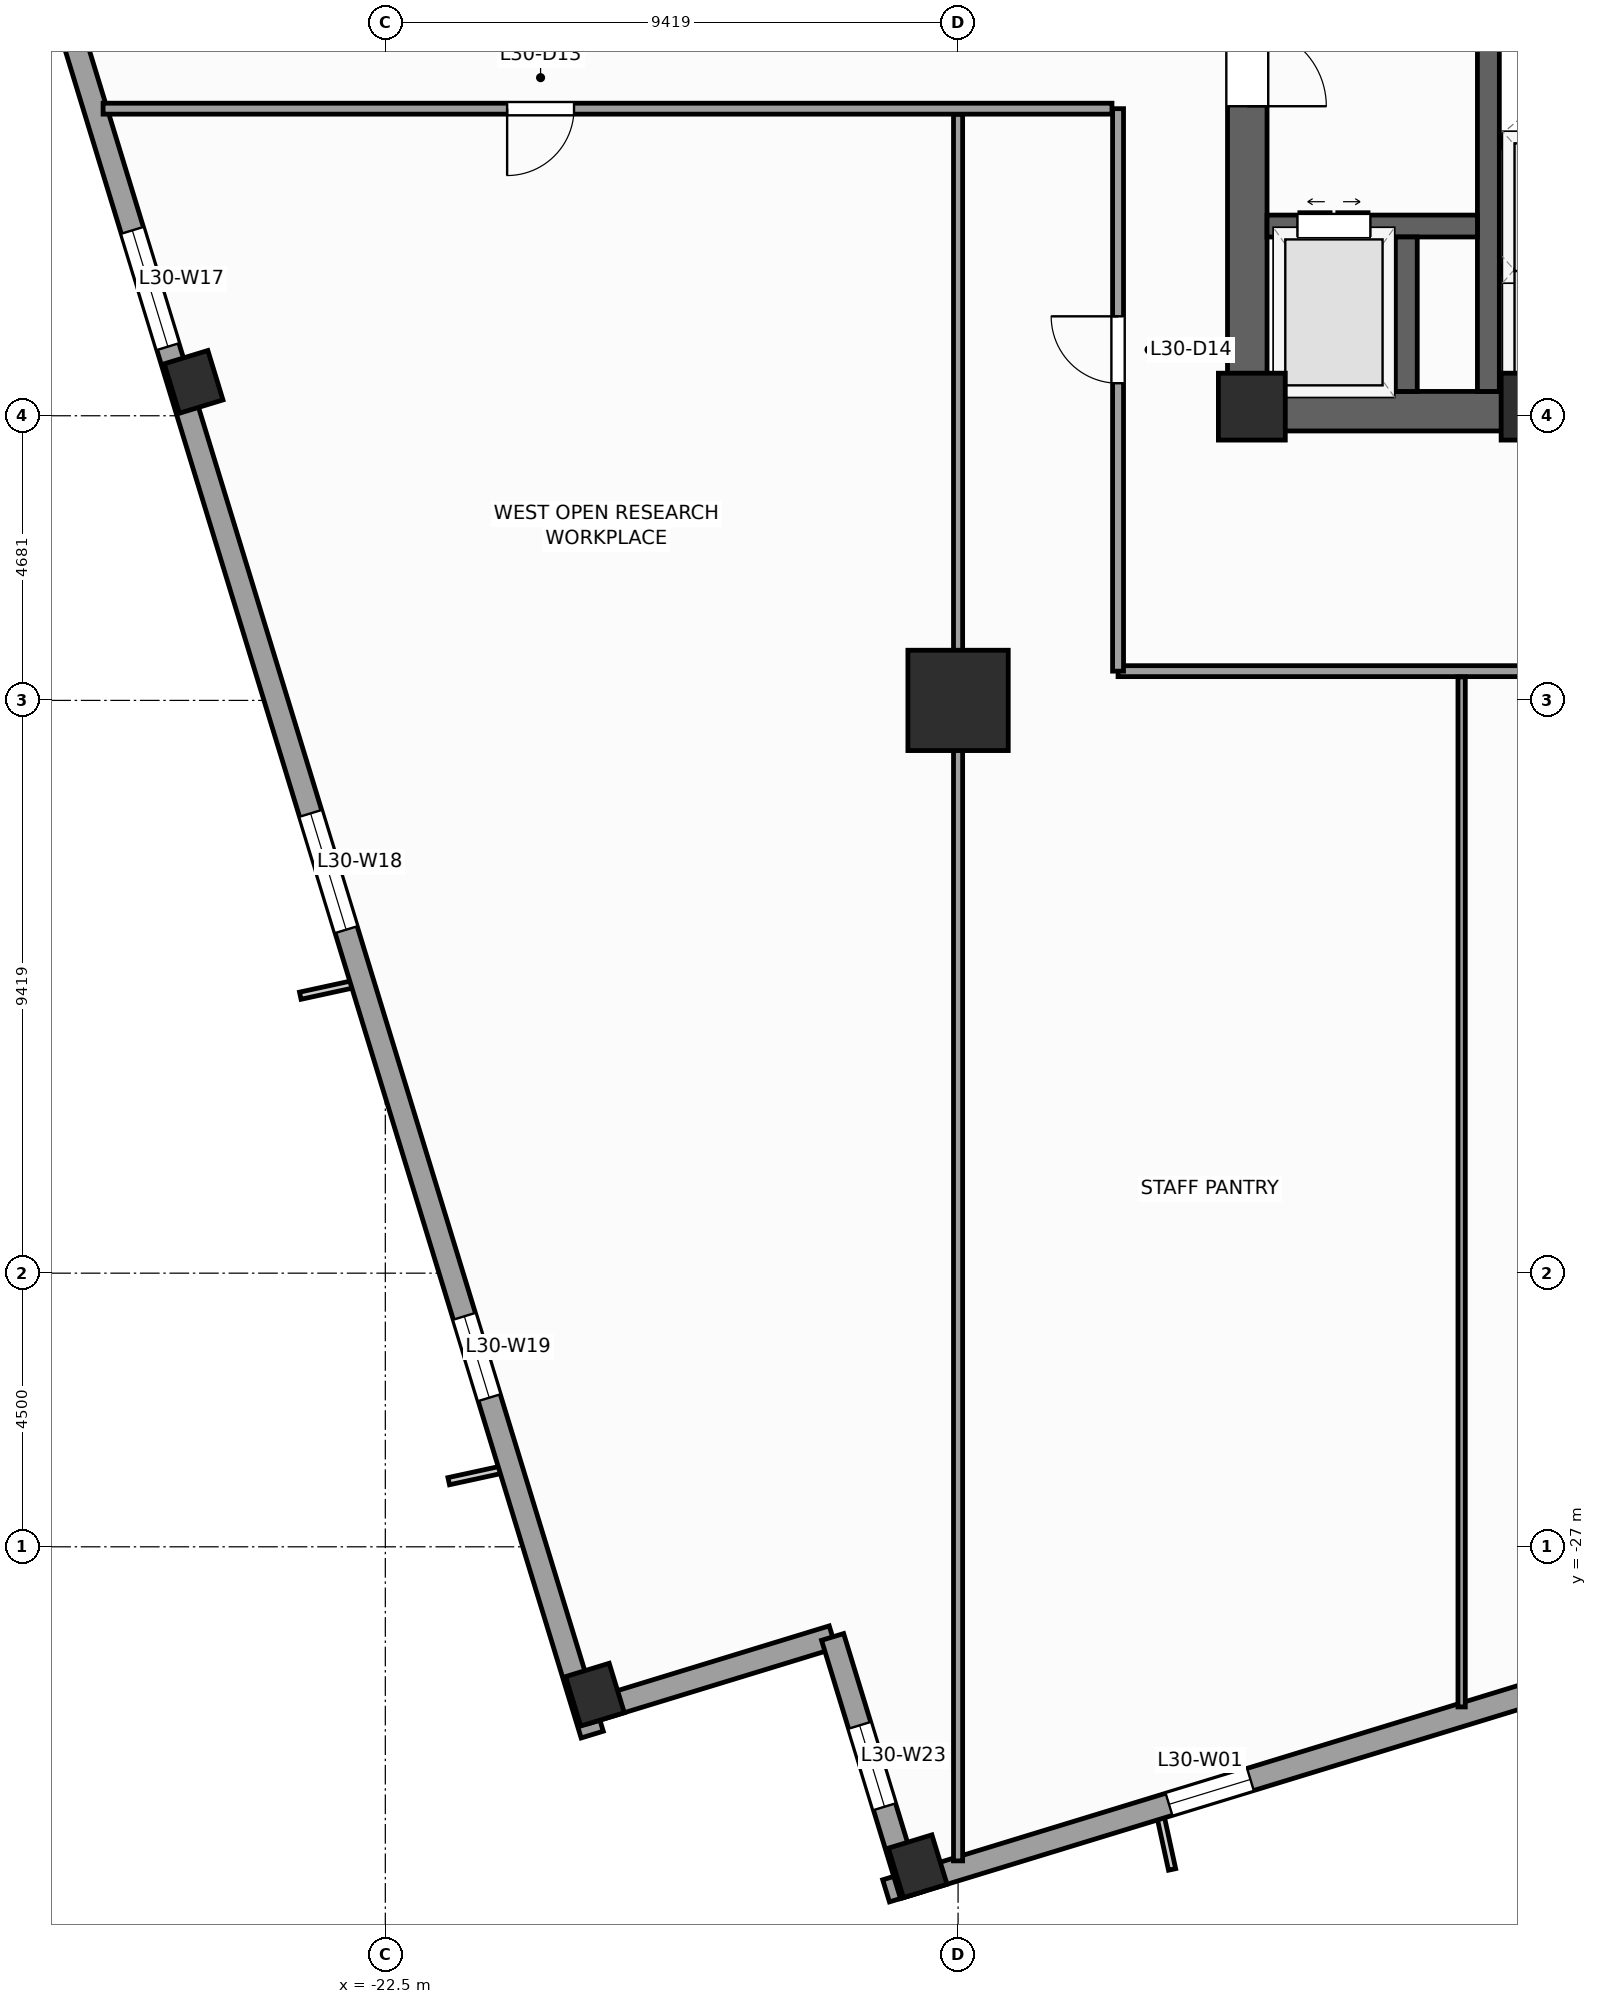
"""IFC4 building model, lengths in metres.
Left out: names, types, materials, properties, quantities, classifications, styles, units other than length and angle.
Written with IfcOpenShell. Run it as: python <this file> out.ifc"""

import sys

from ifc_helpers import new_model, si_unit, direction, frame, frame_2d, origin, origin_2d, place, context, subcontext, project, spatial, rectangle, extrude, source, transform, mapped, element, fill, save


model = new_model("IFC4")
c1 = context("Model", 3, precision=1e-05, world=origin(), true_north=direction((0.0, 1.0)))
c2 = subcontext(c1, "Body", "Model", "MODEL_VIEW")
j1 = project(units=[si_unit("LENGTHUNIT", "METRE"), si_unit("PLANEANGLEUNIT", "RADIAN")], contexts=[c1])
p1 = place(None, origin())
s1 = spatial("IfcSite", under=j1, at=p1, CompositionType="ELEMENT")
p2 = place(p1, origin())
s2 = spatial("IfcBuilding", under=s1, at=p2, CompositionType="ELEMENT")
p3 = place(p2, frame((0.0, 0.0, 127.2)))
s3 = spatial("IfcBuildingStorey", under=s2, at=p3, CompositionType="ELEMENT", Elevation=127.2)
p4 = place(p3, frame((-8.65, -8.325, 0.0), z_axis=(0.0, 0.0, 1.0), x_axis=(1.0, 0.0, 0.0)))
e1 = element("IfcWall", 1, at=p4, inside=s3, PredefinedType="SHEAR", context=c2, shape_type="SweptSolid", body=[
    extrude(rectangle(XDim=17.3, YDim=0.65, at=frame_2d((8.65, 0.0))), origin(), (0.0, 0.0, 1.0), 4.0),
])
p5 = place(p4, frame((8.0, 0.0, 0.0)))
e2 = element("IfcOpeningElement", 2, at=p5, cuts=e1, PredefinedType="OPENING", context=c2, shape_type="SweptSolid", body=[
    extrude(rectangle(XDim=1.3, YDim=2.2, at=frame_2d((0.65, 1.1))), frame((0.0, 0.335, 0.0), z_axis=(0.0, -1.0, 0.0), x_axis=(1.0, 0.0, 0.0)), (0.0, 0.0, 1.0), 0.67),
])
p6 = place(p3, frame((-8.325, -8.0, 0.0), z_axis=(0.0, 0.0, 1.0), x_axis=(0.0, 1.0, 0.0)))
e3 = element("IfcWall", 3, at=p6, inside=s3, PredefinedType="SHEAR", context=c2, shape_type="SweptSolid", body=[
    extrude(rectangle(XDim=16.0, YDim=0.65, at=frame_2d((8.0, 0.0))), origin(), (0.0, 0.0, 1.0), 4.0),
])
p7 = place(p6, frame((4.69, 0.0, 0.0)))
e4 = element("IfcOpeningElement", 4, at=p7, cuts=e3, PredefinedType="OPENING", context=c2, shape_type="SweptSolid", body=[
    extrude(rectangle(XDim=1.3, YDim=2.2, at=frame_2d((0.65, 1.1))), frame((0.0, 0.335, 0.0), z_axis=(0.0, -1.0, 0.0), x_axis=(1.0, 0.0, 0.0)), (0.0, 0.0, 1.0), 0.67),
])
p8 = place(p3, frame((-4.36, -8.0, 0.0), z_axis=(0.0, 0.0, 1.0), x_axis=(0.0, 1.0, 0.0)))
e5 = element("IfcWall", 5, at=p8, inside=s3, PredefinedType="SHEAR", context=c2, shape_type="SweptSolid", body=[
    extrude(rectangle(XDim=16.0, YDim=0.36, at=frame_2d((8.0, 0.0))), origin(), (0.0, 0.0, 1.0), 4.0),
])
p9 = place(p3, frame((-8.0, -5.28, 0.0), z_axis=(0.0, 0.0, 1.0), x_axis=(1.0, 0.0, 0.0)))
e6 = element("IfcWall", 6, at=p9, inside=s3, PredefinedType="SHEAR", context=c2, shape_type="SweptSolid", body=[
    extrude(rectangle(XDim=3.46, YDim=0.36, at=frame_2d((1.73, 0.0))), origin(), (0.0, 0.0, 1.0), 4.0),
])
p10 = place(p9, frame((0.5, 0.0, 0.0)))
e7 = element("IfcOpeningElement", 7, at=p10, cuts=e6, PredefinedType="OPENING", context=c2, shape_type="SweptSolid", body=[
    extrude(rectangle(XDim=1.2, YDim=2.25, at=frame_2d((0.6, 1.125))), frame((0.0, 0.19, 0.0), z_axis=(0.0, -1.0, 0.0), x_axis=(1.0, 0.0, 0.0)), (0.0, 0.0, 1.0), 0.38),
])
p11 = place(p3, frame((-5.71, -8.0, 0.0), z_axis=(0.0, 0.0, 1.0), x_axis=(0.0, 1.0, 0.0)))
e8 = element("IfcWall", 8, at=p11, inside=s3, PredefinedType="SHEAR", context=c2, shape_type="SweptSolid", body=[
    extrude(rectangle(XDim=2.54, YDim=0.36, at=frame_2d((1.27, 0.0))), origin(), (0.0, 0.0, 1.0), 4.0),
])
m1 = source(origin(), c2, "Body", "SweptSolid", [
    extrude(rectangle(XDim=1.1, YDim=1.1, at=origin_2d()), origin(), (0.0, 0.0, 1.0), 4.0),
])
for number, where, z_axis, x_axis in (
    (9, (-8.25, -8.25, 0.0), (0.0, 0.0, 1.0), (1.0, 0.0, 0.0)),
    (10, (-3.6, -8.25, 0.0), (0.0, 0.0, 1.0), (1.0, 0.0, 0.0)),
):
    element("IfcColumn", number, at=place(p3, frame(where, z_axis=z_axis, x_axis=x_axis)), inside=s3, PredefinedType="PILASTER", context=c2, shape_type="MappedRepresentation", body=[
        mapped(m1, transform((0.0, 0.0, 0.0), scale=1.0)),
    ])
m2 = source(origin(), c2, "Body", "SweptSolid", [
    extrude(rectangle(XDim=1.65, YDim=1.65, at=origin_2d()), origin(), (0.0, 0.0, 1.0), 4.0),
])
p12 = place(p3, frame((-13.081, -13.081, 0.0), z_axis=(0.0, 0.0, 1.0), x_axis=(1.0, 0.0, 0.0)))
e11 = element("IfcColumn", 11, at=p12, inside=s3, PredefinedType="COLUMN", context=c2, shape_type="MappedRepresentation", body=[
    mapped(m2, transform((0.0, 0.0, 0.0), scale=1.0)),
])
m3 = source(origin(), c2, "Body", "SweptSolid", [
    extrude(rectangle(XDim=0.75, YDim=0.85, at=origin_2d()), origin(), (0.0, 0.0, 1.0), 4.0),
])
for number, where, z_axis, x_axis in (
    (12, (-13.746, -32.253, 0.0), (0.0, 0.0, 1.0), (0.956, 0.292, 0.0)),
    (13, (-25.653, -7.843, 0.0), (0.0, 0.0, 1.0), (0.956, 0.292, 0.0)),
    (14, (-19.052, -29.431, 0.0), (0.0, 0.0, 1.0), (0.956, 0.292, 0.0)),
):
    element("IfcColumn", number, at=place(p3, frame(where, z_axis=z_axis, x_axis=x_axis)), inside=s3, PredefinedType="COLUMN", context=c2, shape_type="MappedRepresentation", body=[
        mapped(m3, transform((0.0, 0.0, 0.0), scale=1.0)),
    ])
p13 = place(p3, frame((-14.265, -32.658, 0.0), z_axis=(0.0, 0.0, 1.0), x_axis=(0.956304320851, 0.292373127906, 0.0)))
e15 = element("IfcWall", 15, at=p13, inside=s3, PredefinedType="STANDARD", context=c2, shape_type="SweptSolid", body=[
    extrude(rectangle(XDim=46.38, YDim=0.38, at=frame_2d((23.19, 0.0))), origin(), (0.0, 0.0, 1.0), 3.14),
])
p14 = place(p13, frame((17.065, 0.0, 0.0)))
e16 = element("IfcOpeningElement", 16, at=p14, cuts=e15, PredefinedType="OPENING", context=c2, shape_type="SweptSolid", body=[
    extrude(rectangle(XDim=1.05, YDim=2.25, at=frame_2d((0.525, 1.125))), frame((0.0, 0.2, 0.0), z_axis=(0.0, -1.0, 0.0), x_axis=(1.0, 0.0, 0.0)), (0.0, 0.0, 1.0), 0.4),
])
p15 = place(p13, frame((4.865, 0.0, 0.51)))
e17 = element("IfcOpeningElement", 17, at=p15, cuts=e15, PredefinedType="OPENING", context=c2, shape_type="SweptSolid", body=[
    extrude(rectangle(XDim=1.4, YDim=2.4, at=frame_2d((0.7, 1.2))), frame((0.0, 0.2, 0.0), z_axis=(0.0, -1.0, 0.0), x_axis=(1.0, 0.0, 0.0)), (0.0, 0.0, 1.0), 0.4),
])
p16 = place(p13, frame((10.95, 0.0, 0.51)))
e18 = element("IfcOpeningElement", 18, at=p16, cuts=e15, PredefinedType="OPENING", context=c2, shape_type="SweptSolid", body=[
    extrude(rectangle(XDim=2.0, YDim=2.4, at=frame_2d((1.0, 1.2))), frame((0.0, 0.2, 0.0), z_axis=(0.0, -1.0, 0.0), x_axis=(1.0, 0.0, 0.0)), (0.0, 0.0, 1.0), 0.4),
])
p17 = place(p13, frame((20.512, 0.0, 0.51)))
e19 = element("IfcOpeningElement", 19, at=p17, cuts=e15, PredefinedType="OPENING", context=c2, shape_type="SweptSolid", body=[
    extrude(rectangle(XDim=2.0, YDim=2.4, at=frame_2d((1.0, 1.2))), frame((0.0, 0.2, 0.0), z_axis=(0.0, -1.0, 0.0), x_axis=(1.0, 0.0, 0.0)), (0.0, 0.0, 1.0), 0.4),
])
p18 = place(p13, frame((30.538, 0.0, 0.51)))
e20 = element("IfcOpeningElement", 20, at=p18, cuts=e15, PredefinedType="OPENING", context=c2, shape_type="SweptSolid", body=[
    extrude(rectangle(XDim=2.0, YDim=2.4, at=frame_2d((1.0, 1.2))), frame((0.0, 0.2, 0.0), z_axis=(0.0, -1.0, 0.0), x_axis=(1.0, 0.0, 0.0)), (0.0, 0.0, 1.0), 0.4),
])
p19 = place(p13, frame((39.187, 0.0, 0.51)))
e21 = element("IfcOpeningElement", 21, at=p19, cuts=e15, PredefinedType="OPENING", context=c2, shape_type="SweptSolid", body=[
    extrude(rectangle(XDim=1.4, YDim=2.4, at=frame_2d((0.7, 1.2))), frame((0.0, 0.2, 0.0), z_axis=(0.0, -1.0, 0.0), x_axis=(1.0, 0.0, 0.0)), (0.0, 0.0, 1.0), 0.4),
])
p20 = place(p3, frame((-32.658, 14.265, 0.0), z_axis=(0.0, 0.0, 1.0), x_axis=(0.292373127906, -0.956304320851, 0.0)))
e22 = element("IfcWall", 22, at=p20, inside=s3, PredefinedType="STANDARD", context=c2, shape_type="SweptSolid", body=[
    extrude(rectangle(XDim=46.38, YDim=0.38, at=frame_2d((23.19, 0.0))), origin(), (0.0, 0.0, 1.0), 3.14),
])
p21 = place(p20, frame((4.865, 0.0, 0.51)))
e23 = element("IfcOpeningElement", 23, at=p21, cuts=e22, PredefinedType="OPENING", context=c2, shape_type="SweptSolid", body=[
    extrude(rectangle(XDim=1.4, YDim=2.4, at=frame_2d((0.7, 1.2))), frame((0.0, 0.2, 0.0), z_axis=(0.0, -1.0, 0.0), x_axis=(1.0, 0.0, 0.0)), (0.0, 0.0, 1.0), 0.4),
])
p22 = place(p20, frame((12.45, 0.0, 0.51)))
e24 = element("IfcOpeningElement", 24, at=p22, cuts=e22, PredefinedType="OPENING", context=c2, shape_type="SweptSolid", body=[
    extrude(rectangle(XDim=2.0, YDim=2.4, at=frame_2d((1.0, 1.2))), frame((0.0, 0.2, 0.0), z_axis=(0.0, -1.0, 0.0), x_axis=(1.0, 0.0, 0.0)), (0.0, 0.0, 1.0), 0.4),
])
p23 = place(p20, frame((20.512, 0.0, 0.51)))
e25 = element("IfcOpeningElement", 25, at=p23, cuts=e22, PredefinedType="OPENING", context=c2, shape_type="SweptSolid", body=[
    extrude(rectangle(XDim=2.0, YDim=2.4, at=frame_2d((1.0, 1.2))), frame((0.0, 0.2, 0.0), z_axis=(0.0, -1.0, 0.0), x_axis=(1.0, 0.0, 0.0)), (0.0, 0.0, 1.0), 0.4),
])
p24 = place(p20, frame((30.538, 0.0, 0.51)))
e26 = element("IfcOpeningElement", 26, at=p24, cuts=e22, PredefinedType="OPENING", context=c2, shape_type="SweptSolid", body=[
    extrude(rectangle(XDim=2.0, YDim=2.4, at=frame_2d((1.0, 1.2))), frame((0.0, 0.2, 0.0), z_axis=(0.0, -1.0, 0.0), x_axis=(1.0, 0.0, 0.0)), (0.0, 0.0, 1.0), 0.4),
])
p25 = place(p20, frame((39.187, 0.0, 0.51)))
e27 = element("IfcOpeningElement", 27, at=p25, cuts=e22, PredefinedType="OPENING", context=c2, shape_type="SweptSolid", body=[
    extrude(rectangle(XDim=1.4, YDim=2.4, at=frame_2d((0.7, 1.2))), frame((0.0, 0.2, 0.0), z_axis=(0.0, -1.0, 0.0), x_axis=(1.0, 0.0, 0.0)), (0.0, 0.0, 1.0), 0.4),
])
p26 = place(p3, frame((-19.208, -29.725, 0.0), z_axis=(0.0, 0.0, 1.0), x_axis=(0.956312764915, 0.292345507338, 0.0)))
e28 = element("IfcWall", 28, at=p26, inside=s3, PredefinedType="STANDARD", context=c2, shape_type="SweptSolid", body=[
    extrude(rectangle(XDim=4.25, YDim=0.38, at=frame_2d((2.125, 0.0))), origin(), (0.0, 0.0, 1.0), 3.74),
])
p27 = place(p3, frame((-15.144, -28.482, 0.0), z_axis=(0.0, 0.0, 1.0), x_axis=(0.292373601522, -0.956304176051, 0.0)))
e29 = element("IfcWall", 29, at=p27, inside=s3, PredefinedType="STANDARD", context=c2, shape_type="SweptSolid", body=[
    extrude(rectangle(XDim=4.44, YDim=0.38, at=frame_2d((2.22, 0.0))), origin(), (0.0, 0.0, 1.0), 3.04),
])
p28 = place(p27, frame((1.52, 0.0, 0.51)))
e30 = element("IfcOpeningElement", 30, at=p28, cuts=e29, PredefinedType="OPENING", context=c2, shape_type="SweptSolid", body=[
    extrude(rectangle(XDim=1.4, YDim=2.4, at=frame_2d((0.7, 1.2))), frame((0.0, 0.2, 0.0), z_axis=(0.0, -1.0, 0.0), x_axis=(1.0, 0.0, 0.0)), (0.0, 0.0, 1.0), 0.4),
])
p29 = place(p3, frame((-4.17, -3.9, 0.0), z_axis=(0.0, 0.0, 1.0), x_axis=(1.0, 0.0, 0.0)))
e31 = element("IfcWall", 31, at=p29, inside=s3, PredefinedType="PARTITIONING", context=c2, shape_type="SweptSolid", body=[
    extrude(rectangle(XDim=2.28, YDim=0.18, at=frame_2d((1.14, 0.0))), origin(), (0.0, 0.0, 1.0), 3.74),
])
p30 = place(p3, frame((-4.16, -6.0, 0.0), z_axis=(0.0, 0.0, 1.0), x_axis=(1.0, 0.0, 0.0)))
e32 = element("IfcWall", 32, at=p30, inside=s3, PredefinedType="PARTITIONING", context=c2, shape_type="SweptSolid", body=[
    extrude(rectangle(XDim=2.26, YDim=0.12, at=frame_2d((1.13, 0.0))), origin(), (0.0, 0.0, 1.0), 3.74),
])
p31 = place(p3, frame((-10.45, -12.6, 0.0), z_axis=(0.0, 0.0, 1.0), x_axis=(1.0, 0.0, 0.0)))
e33 = element("IfcWall", 33, at=p31, inside=s3, PredefinedType="PARTITIONING", context=c2, shape_type="SweptSolid", body=[
    extrude(rectangle(XDim=9.3, YDim=0.18, at=frame_2d((4.65, 0.0))), origin(), (0.0, 0.0, 1.0), 3.74),
])
p32 = place(p3, frame((-10.45, -12.6, 0.0), z_axis=(0.0, 0.0, 1.0), x_axis=(0.0, 1.0, 0.0)))
e34 = element("IfcWall", 34, at=p32, inside=s3, PredefinedType="PARTITIONING", context=c2, shape_type="SweptSolid", body=[
    extrude(rectangle(XDim=9.25, YDim=0.18, at=frame_2d((4.625, 0.0))), origin(), (0.0, 0.0, 1.0), 3.74),
])
p33 = place(p32, frame((4.735, 0.0, 0.0)))
e35 = element("IfcOpeningElement", 35, at=p33, cuts=e34, PredefinedType="OPENING", context=c2, shape_type="SweptSolid", body=[
    extrude(rectangle(XDim=1.1, YDim=2.2, at=frame_2d((0.55, 1.1))), frame((0.0, 0.1, 0.0), z_axis=(0.0, -1.0, 0.0), x_axis=(1.0, 0.0, 0.0)), (0.0, 0.0, 1.0), 0.2),
])
p34 = place(p3, frame((-27.142, -3.35, 0.0), z_axis=(0.0, 0.0, 1.0), x_axis=(1.0, 0.0, 0.0)))
e36 = element("IfcWall", 36, at=p34, inside=s3, PredefinedType="PARTITIONING", context=c2, shape_type="SweptSolid", body=[
    extrude(rectangle(XDim=16.592, YDim=0.18, at=frame_2d((8.296, 0.0))), origin(), (0.0, 0.0, 1.0), 3.74),
])
p35 = place(p34, frame((6.645, 0.0, 0.0)))
e37 = element("IfcOpeningElement", 37, at=p35, cuts=e36, PredefinedType="OPENING", context=c2, shape_type="SweptSolid", body=[
    extrude(rectangle(XDim=1.1, YDim=2.2, at=frame_2d((0.55, 1.1))), frame((0.0, 0.1, 0.0), z_axis=(0.0, -1.0, 0.0), x_axis=(1.0, 0.0, 0.0)), (0.0, 0.0, 1.0), 0.2),
])
p36 = place(p3, frame((-13.081, -32.165, 0.0), z_axis=(0.0, 0.0, 1.0), x_axis=(0.0, 1.0, 0.0)))
e38 = element("IfcWall", 38, at=p36, inside=s3, PredefinedType="PARTITIONING", context=c2, shape_type="SweptSolid", body=[
    extrude(rectangle(XDim=28.72, YDim=0.15, at=frame_2d((14.36, 0.0))), origin(), (0.0, 0.0, 1.0), 2.732),
])
p37 = place(p3, frame((-4.8, -29.633, 0.0), z_axis=(0.0, 0.0, 1.0), x_axis=(0.0, 1.0, 0.0)))
e39 = element("IfcWall", 39, at=p37, inside=s3, PredefinedType="PARTITIONING", context=c2, shape_type="SweptSolid", body=[
    extrude(rectangle(XDim=16.938, YDim=0.12, at=frame_2d((8.469, 0.0))), origin(), (0.0, 0.0, 1.0), 3.74),
])
m4 = source(origin(), c2, "Body", "SweptSolid", [
    extrude(rectangle(XDim=1.4, YDim=2.4, at=frame_2d((0.7, 1.2))), frame((0.0, 0.03, 0.0), z_axis=(0.0, -1.0, 0.0), x_axis=(1.0, 0.0, 0.0)), (0.0, 0.0, 1.0), 0.06),
])
p38 = place(p15, origin())
e40 = element("IfcWindow", 40, at=p38, inside=s3, PartitioningType="SINGLE_PANEL", PredefinedType="WINDOW", context=c2, shape_type="MappedRepresentation", body=[
    mapped(m4, transform((0.0, 0.0, 0.0), scale=1.0)),
])
fill(e17, e40)
m5 = source(origin(), c2, "Body", "SweptSolid", [
    extrude(rectangle(XDim=2.0, YDim=2.4, at=frame_2d((1.0, 1.2))), frame((0.0, 0.03, 0.0), z_axis=(0.0, -1.0, 0.0), x_axis=(1.0, 0.0, 0.0)), (0.0, 0.0, 1.0), 0.06),
])
p39 = place(p23, origin())
e41 = element("IfcWindow", 41, at=p39, inside=s3, PartitioningType="SINGLE_PANEL", PredefinedType="WINDOW", context=c2, shape_type="MappedRepresentation", body=[
    mapped(m5, transform((0.0, 0.0, 0.0), scale=1.0)),
])
fill(e25, e41)
p40 = place(p24, origin())
e42 = element("IfcWindow", 42, at=p40, inside=s3, PartitioningType="SINGLE_PANEL", PredefinedType="WINDOW", context=c2, shape_type="MappedRepresentation", body=[
    mapped(m5, transform((0.0, 0.0, 0.0), scale=1.0)),
])
fill(e26, e42)
p41 = place(p25, origin())
e43 = element("IfcWindow", 43, at=p41, inside=s3, PartitioningType="SINGLE_PANEL", PredefinedType="WINDOW", context=c2, shape_type="MappedRepresentation", body=[
    mapped(m4, transform((0.0, 0.0, 0.0), scale=1.0)),
])
fill(e27, e43)
p42 = place(p28, origin())
e44 = element("IfcWindow", 44, at=p42, inside=s3, PartitioningType="SINGLE_PANEL", PredefinedType="WINDOW", context=c2, shape_type="MappedRepresentation", body=[
    mapped(m4, transform((0.0, 0.0, 0.0), scale=1.0)),
])
fill(e30, e44)
m6 = source(origin(), c2, "Body", "SweptSolid", [
    extrude(rectangle(XDim=1.3, YDim=2.2, at=frame_2d((0.65, 1.1))), frame((0.0, 0.025, 0.0), z_axis=(0.0, -1.0, 0.0), x_axis=(1.0, 0.0, 0.0)), (0.0, 0.0, 1.0), 0.05),
])
p43 = place(p7, frame((1.3, 0.0, 0.0), z_axis=(0.0, 0.0, 1.0), x_axis=(-1.0, 0.0, 0.0)))
e45 = element("IfcDoor", 45, at=p43, inside=s3, OperationType="SINGLE_SWING_LEFT", PredefinedType="DOOR", context=c2, shape_type="MappedRepresentation", body=[
    mapped(m6, transform((0.0, 0.0, 0.0), scale=1.0)),
])
fill(e4, e45)
m7 = source(origin(), c2, "Body", "SweptSolid", [
    extrude(rectangle(XDim=1.2, YDim=2.25, at=frame_2d((0.6, 1.125))), frame((0.0, 0.025, 0.0), z_axis=(0.0, -1.0, 0.0), x_axis=(1.0, 0.0, 0.0)), (0.0, 0.0, 1.0), 0.05),
])
p44 = place(p10, origin())
e46 = element("IfcDoor", 46, at=p44, inside=s3, OperationType="DOUBLE_DOOR_SLIDING", PredefinedType="DOOR", context=c2, shape_type="MappedRepresentation", body=[
    mapped(m7, transform((0.0, 0.0, 0.0), scale=1.0)),
])
fill(e7, e46)
m8 = source(origin(), c2, "Body", "SweptSolid", [
    extrude(rectangle(XDim=1.1, YDim=2.2, at=frame_2d((0.55, 1.1))), frame((0.0, 0.025, 0.0), z_axis=(0.0, -1.0, 0.0), x_axis=(1.0, 0.0, 0.0)), (0.0, 0.0, 1.0), 0.05),
])
p45 = place(p35, frame((1.1, 0.0, 0.0), z_axis=(0.0, 0.0, 1.0), x_axis=(-1.0, 0.0, 0.0)))
e47 = element("IfcDoor", 47, at=p45, inside=s3, OperationType="SINGLE_SWING_LEFT", PredefinedType="DOOR", context=c2, shape_type="MappedRepresentation", body=[
    mapped(m8, transform((0.0, 0.0, 0.0), scale=1.0)),
])
fill(e37, e47)
p46 = place(p33, origin())
e48 = element("IfcDoor", 48, at=p46, inside=s3, OperationType="SINGLE_SWING_RIGHT", PredefinedType="DOOR", context=c2, shape_type="MappedRepresentation", body=[
    mapped(m8, transform((0.0, 0.0, 0.0), scale=1.0)),
])
fill(e35, e48)
save(model, sys.argv[1])
